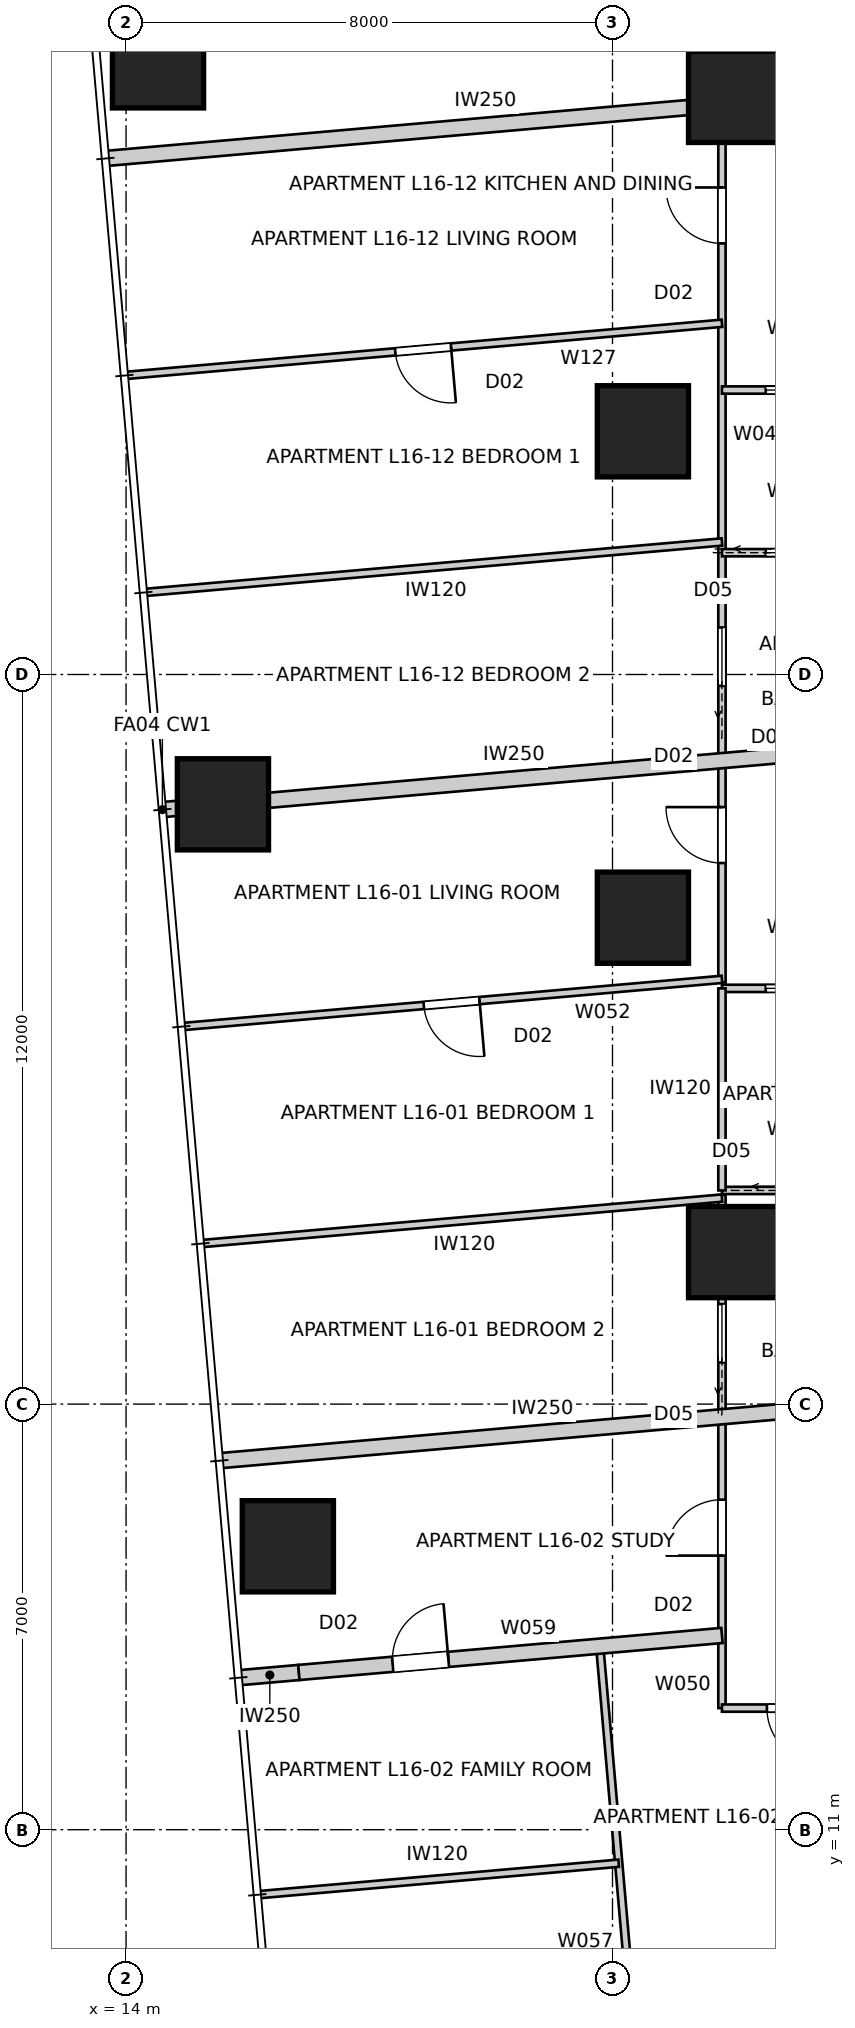
"""IFC4 building model, lengths in metres.
Left out: names, types, materials, properties, quantities, classifications, styles, units other than length and angle.
Written with IfcOpenShell. Run it as: python <this file> out.ifc"""

import sys

from ifc_helpers import new_model, si_unit, direction, frame, frame_2d, origin, origin_2d, place, context, subcontext, project, spatial, rectangle, extrude, element, fill, save


model = new_model("IFC4")
c1 = context("Model", 3, precision=1e-05, world=origin(), true_north=direction((0.0, 1.0)))
c2 = subcontext(c1, "Body", "Model", "MODEL_VIEW")
j1 = project(units=[si_unit("LENGTHUNIT", "METRE"), si_unit("PLANEANGLEUNIT", "RADIAN")], contexts=[c1])
p1 = place(None, origin())
s1 = spatial("IfcSite", under=j1, at=p1, CompositionType="ELEMENT")
p2 = place(p1, origin())
s2 = spatial("IfcBuilding", under=s1, at=p2, CompositionType="ELEMENT")
p3 = place(p2, frame((0.0, 0.0, 60.8)))
s3 = spatial("IfcBuildingStorey", under=s2, at=p3, CompositionType="ELEMENT", Elevation=60.8)
for number, where, z_axis, x_axis in (
    (1, (14.526, 40.068, 0.0), (0.0, 0.0, 1.0), (1.0, 0.0, 0.0)),
    (2, (15.593, 27.865, 0.0), (0.0, 0.0, 1.0), (1.0, 0.0, 0.0)),
    (3, (16.661, 15.661, 0.0), (0.0, 0.0, 1.0), (1.0, 0.0, 0.0)),
    (4, (24.0, 39.5, 0.0), (0.0, 0.0, 1.0), (1.0, 0.0, 0.0)),
    (5, (22.5, 34.0, 0.0), (0.0, 0.0, 1.0), (1.0, 0.0, 0.0)),
    (6, (22.5, 26.0, 0.0), (0.0, 0.0, 1.0), (1.0, 0.0, 0.0)),
    (7, (24.0, 20.5, 0.0), (0.0, 0.0, 1.0), (1.0, 0.0, 0.0)),
):
    element("IfcColumn", number, at=place(p3, frame(where, z_axis=z_axis, x_axis=x_axis)), inside=s3, PredefinedType="COLUMN", context=c2, shape_type="SweptSolid", body=[
        extrude(rectangle(XDim=1.5, YDim=1.5, at=origin_2d()), origin(), (0.0, 0.0, 1.0), 3.4),
    ])
p4 = place(p3, frame((13.66, 38.487, 0.0), z_axis=(0.0, 0.0, 1.0), x_axis=(0.996194851608, 0.087153988028, 0.0)))
e8 = element("IfcWall", 8, at=p4, inside=s3, PredefinedType="PARTITIONING", context=c2, shape_type="SweptSolid", body=[
    extrude(rectangle(XDim=12.617, YDim=0.25, at=frame_2d((6.309, 0.0))), origin(), (0.0, 0.0, 1.0), 3.25),
])
p5 = place(p3, frame((15.534, 17.068, 0.0), z_axis=(0.0, 0.0, 1.0), x_axis=(0.996193939644, 0.08716441141, 0.0)))
e9 = element("IfcWall", 9, at=p5, inside=s3, PredefinedType="PARTITIONING", context=c2, shape_type="SweptSolid", body=[
    extrude(rectangle(XDim=10.736, YDim=0.25, at=frame_2d((5.368, 0.0))), origin(), (0.0, 0.0, 1.0), 3.25),
])
p6 = place(p3, frame((14.597, 27.778, 0.0), z_axis=(0.0, 0.0, 1.0), x_axis=(0.996195419442, 0.087147497287, 0.0)))
e10 = element("IfcWall", 10, at=p6, inside=s3, PredefinedType="PARTITIONING", context=c2, shape_type="SweptSolid", body=[
    extrude(rectangle(XDim=11.677, YDim=0.25, at=frame_2d((5.838, 0.0))), origin(), (0.0, 0.0, 1.0), 3.25),
])
p7 = place(p3, frame((26.2, 24.838, 0.0), z_axis=(0.0, 0.0, 1.0), x_axis=(-1.0, 0.0, 0.0)))
e11 = element("IfcWall", 11, at=p7, inside=s3, PredefinedType="PARTITIONING", context=c2, shape_type="SweptSolid", body=[
    extrude(rectangle(XDim=2.4, YDim=0.12, at=frame_2d((1.2, 0.0))), origin(), (0.0, 0.0, 1.0), 3.25),
])
p8 = place(p7, frame((0.72, 0.0, 0.0)))
e12 = element("IfcOpeningElement", 12, at=p8, cuts=e11, PredefinedType="OPENING", context=c2, shape_type="SweptSolid", body=[
    extrude(rectangle(XDim=0.96, YDim=2.1, at=frame_2d((0.48, 1.05))), frame((0.0, 0.07, 0.0), z_axis=(0.0, -1.0, 0.0), x_axis=(1.0, 0.0, 0.0)), (0.0, 0.0, 1.0), 0.14),
])
p9 = place(p3, frame((23.8, 24.936, 0.0), z_axis=(0.0, 0.0, 1.0), x_axis=(0.0, 1.0, 0.0)))
e13 = element("IfcWall", 13, at=p9, inside=s3, PredefinedType="PARTITIONING", context=c2, shape_type="SweptSolid", body=[
    extrude(rectangle(XDim=22.064, YDim=0.12, at=frame_2d((11.032, 0.0))), origin(), (0.0, 0.0, 1.0), 2.55),
])
p10 = place(p9, frame((12.155, 0.0, 0.0)))
e14 = element("IfcOpeningElement", 14, at=p10, cuts=e13, PredefinedType="OPENING", context=c2, shape_type="SweptSolid", body=[
    extrude(rectangle(XDim=0.92, YDim=2.34, at=frame_2d((0.46, 1.17))), frame((0.0, 0.07, 0.0), z_axis=(0.0, -1.0, 0.0), x_axis=(1.0, 0.0, 0.0)), (0.0, 0.0, 1.0), 0.14),
])
p11 = place(p9, frame((16.136, 0.0, 0.0)))
e15 = element("IfcOpeningElement", 15, at=p11, cuts=e13, PredefinedType="OPENING", context=c2, shape_type="SweptSolid", body=[
    extrude(rectangle(XDim=0.92, YDim=2.34, at=frame_2d((0.46, 1.17))), frame((0.0, 0.07, 0.0), z_axis=(0.0, -1.0, 0.0), x_axis=(1.0, 0.0, 0.0)), (0.0, 0.0, 1.0), 0.14),
])
p12 = place(p9, frame((1.964, 0.0, 0.0)))
e16 = element("IfcOpeningElement", 16, at=p12, cuts=e13, PredefinedType="OPENING", context=c2, shape_type="SweptSolid", body=[
    extrude(rectangle(XDim=0.92, YDim=2.34, at=frame_2d((0.46, 1.17))), frame((0.0, 0.07, 0.0), z_axis=(0.0, -1.0, 0.0), x_axis=(1.0, 0.0, 0.0)), (0.0, 0.0, 1.0), 0.14),
])
p13 = place(p9, frame((4.877, 0.0, 0.0)))
e17 = element("IfcOpeningElement", 17, at=p13, cuts=e13, PredefinedType="OPENING", context=c2, shape_type="SweptSolid", body=[
    extrude(rectangle(XDim=0.96, YDim=2.1, at=frame_2d((0.48, 1.05))), frame((0.0, 0.07, 0.0), z_axis=(0.0, -1.0, 0.0), x_axis=(1.0, 0.0, 0.0)), (0.0, 0.0, 1.0), 0.14),
])
p14 = place(p3, frame((23.8, 21.514, 0.0), z_axis=(0.0, 0.0, 1.0), x_axis=(1.0, 0.0, 0.0)))
e18 = element("IfcWall", 18, at=p14, inside=s3, PredefinedType="PARTITIONING", context=c2, shape_type="SweptSolid", body=[
    extrude(rectangle(XDim=2.4, YDim=0.12, at=frame_2d((1.2, 0.0))), origin(), (0.0, 0.0, 1.0), 3.25),
])
p15 = place(p14, frame((1.02, 0.0, 0.0)))
e19 = element("IfcOpeningElement", 19, at=p15, cuts=e18, PredefinedType="OPENING", context=c2, shape_type="SweptSolid", body=[
    extrude(rectangle(XDim=0.96, YDim=2.1, at=frame_2d((0.48, 1.05))), frame((0.0, 0.07, 0.0), z_axis=(0.0, -1.0, 0.0), x_axis=(1.0, 0.0, 0.0)), (0.0, 0.0, 1.0), 0.14),
])
p16 = place(p3, frame((23.8, 13.0, 0.0), z_axis=(0.0, 0.0, 1.0), x_axis=(0.0, 1.0, 0.0)))
e20 = element("IfcWall", 20, at=p16, inside=s3, PredefinedType="PARTITIONING", context=c2, shape_type="SweptSolid", body=[
    extrude(rectangle(XDim=8.439, YDim=0.12, at=frame_2d((4.219, 0.0))), origin(), (0.0, 0.0, 1.0), 2.55),
])
p17 = place(p16, frame((2.508, 0.0, 0.0)))
e21 = element("IfcOpeningElement", 21, at=p17, cuts=e20, PredefinedType="OPENING", context=c2, shape_type="SweptSolid", body=[
    extrude(rectangle(XDim=0.92, YDim=2.34, at=frame_2d((0.46, 1.17))), frame((0.0, 0.07, 0.0), z_axis=(0.0, -1.0, 0.0), x_axis=(1.0, 0.0, 0.0)), (0.0, 0.0, 1.0), 0.14),
])
p18 = place(p16, frame((5.685, 0.0, 0.0)))
e22 = element("IfcOpeningElement", 22, at=p18, cuts=e20, PredefinedType="OPENING", context=c2, shape_type="SweptSolid", body=[
    extrude(rectangle(XDim=0.96, YDim=2.1, at=frame_2d((0.48, 1.05))), frame((0.0, 0.07, 0.0), z_axis=(0.0, -1.0, 0.0), x_axis=(1.0, 0.0, 0.0)), (0.0, 0.0, 1.0), 0.14),
])
p19 = place(p3, frame((23.8, 21.514, 0.0), z_axis=(0.0, 0.0, 1.0), x_axis=(0.0, 1.0, 0.0)))
e23 = element("IfcWall", 23, at=p19, inside=s3, PredefinedType="PARTITIONING", context=c2, shape_type="SweptSolid", body=[
    extrude(rectangle(XDim=3.324, YDim=0.12, at=frame_2d((1.662, 0.0))), origin(), (0.0, 0.0, 1.0), 3.25),
])
p20 = place(p3, frame((23.8, 24.986, 0.0), z_axis=(0.0, 0.0, 1.0), x_axis=(-0.996194045583, -0.087163200634, 0.0)))
e24 = element("IfcWall", 24, at=p20, inside=s3, PredefinedType="PARTITIONING", context=c2, shape_type="SweptSolid", body=[
    extrude(rectangle(XDim=8.885, YDim=0.12, at=frame_2d((4.442, 0.0))), origin(), (0.0, 0.0, 1.0), 3.25),
])
p21 = place(p20, frame((4.002, 0.0, 0.0)))
e25 = element("IfcOpeningElement", 25, at=p21, cuts=e24, PredefinedType="OPENING", context=c2, shape_type="SweptSolid", body=[
    extrude(rectangle(XDim=0.92, YDim=2.34, at=frame_2d((0.46, 1.17))), frame((0.0, 0.07, 0.0), z_axis=(0.0, -1.0, 0.0), x_axis=(1.0, 0.0, 0.0)), (0.0, 0.0, 1.0), 0.14),
])
p22 = place(p3, frame((23.8, 21.389, 0.0), z_axis=(0.0, 0.0, 1.0), x_axis=(-0.996194273991, -0.087160590107, 0.0)))
e26 = element("IfcWall", 26, at=p22, inside=s3, PredefinedType="PARTITIONING", context=c2, shape_type="SweptSolid", body=[
    extrude(rectangle(XDim=8.571, YDim=0.12, at=frame_2d((4.286, 0.0))), origin(), (0.0, 0.0, 1.0), 3.25),
])
p23 = place(p3, frame((30.333, 13.0, 0.0), z_axis=(0.0, 0.0, 1.0), x_axis=(-1.0, 0.0, 0.0)))
e27 = element("IfcWall", 27, at=p23, inside=s3, PredefinedType="PARTITIONING", context=c2, shape_type="SweptSolid", body=[
    extrude(rectangle(XDim=6.533, YDim=0.12, at=frame_2d((3.267, 0.0))), origin(), (0.0, 0.0, 1.0), 3.25),
])
p24 = place(p23, frame((4.873, 0.0, 0.0)))
e28 = element("IfcOpeningElement", 28, at=p24, cuts=e27, PredefinedType="OPENING", context=c2, shape_type="SweptSolid", body=[
    extrude(rectangle(XDim=0.92, YDim=2.34, at=frame_2d((0.46, 1.17))), frame((0.0, 0.07, 0.0), z_axis=(0.0, -1.0, 0.0), x_axis=(1.0, 0.0, 0.0)), (0.0, 0.0, 1.0), 0.14),
])
p25 = place(p23, frame((1.162, 0.0, 0.0)))
e29 = element("IfcOpeningElement", 29, at=p25, cuts=e27, PredefinedType="OPENING", context=c2, shape_type="SweptSolid", body=[
    extrude(rectangle(XDim=0.96, YDim=2.1, at=frame_2d((0.48, 1.05))), frame((0.0, 0.07, 0.0), z_axis=(0.0, -1.0, 0.0), x_axis=(1.0, 0.0, 0.0)), (0.0, 0.0, 1.0), 0.14),
])
p26 = place(p3, frame((22.759, 2.934, 0.0), z_axis=(0.0, 0.0, 1.0), x_axis=(-0.087130477128, 0.996196908224, 0.0)))
e30 = element("IfcWall", 30, at=p26, inside=s3, PredefinedType="PARTITIONING", context=c2, shape_type="SweptSolid", body=[
    extrude(rectangle(XDim=11.127, YDim=0.12, at=frame_2d((5.563, 0.0))), origin(), (0.0, 0.0, 1.0), 3.25),
])
p27 = place(p26, frame((3.317, 0.0, 0.0)))
e31 = element("IfcOpeningElement", 31, at=p27, cuts=e30, PredefinedType="OPENING", context=c2, shape_type="SweptSolid", body=[
    extrude(rectangle(XDim=0.92, YDim=2.34, at=frame_2d((0.46, 1.17))), frame((0.0, 0.07, 0.0), z_axis=(0.0, -1.0, 0.0), x_axis=(1.0, 0.0, 0.0)), (0.0, 0.0, 1.0), 0.14),
])
p28 = place(p3, frame((15.886, 13.502, 0.0), z_axis=(0.0, 0.0, 1.0), x_axis=(0.996187918168, 0.087233202944, 0.0)))
e32 = element("IfcWall", 32, at=p28, inside=s3, PredefinedType="PARTITIONING", context=c2, shape_type="SweptSolid", body=[
    extrude(rectangle(XDim=0.96, YDim=0.25, at=frame_2d((0.48, 0.0))), origin(), (0.0, 0.0, 1.0), 3.25),
])
p29 = place(p3, frame((16.843, 13.586, 0.0), z_axis=(0.0, 0.0, 1.0), x_axis=(0.996195462691, 0.087147002895, 0.0)))
e33 = element("IfcWall", 33, at=p29, inside=s3, PredefinedType="PARTITIONING", context=c2, shape_type="SweptSolid", body=[
    extrude(rectangle(XDim=6.984, YDim=0.25, at=frame_2d((3.492, 0.0))), origin(), (0.0, 0.0, 1.0), 2.638),
])
p30 = place(p29, frame((1.548, 0.0, 0.0)))
e34 = element("IfcOpeningElement", 34, at=p30, cuts=e33, PredefinedType="OPENING", context=c2, shape_type="SweptSolid", body=[
    extrude(rectangle(XDim=0.92, YDim=2.34, at=frame_2d((0.46, 1.17))), frame((0.0, 0.135, 0.0), z_axis=(0.0, -1.0, 0.0), x_axis=(1.0, 0.0, 0.0)), (0.0, 0.0, 1.0), 0.27),
])
p31 = place(p3, frame((16.198, 9.933, 0.0), z_axis=(0.0, 0.0, 1.0), x_axis=(0.996196712973, 0.08713270948, 0.0)))
e35 = element("IfcWall", 35, at=p31, inside=s3, PredefinedType="PARTITIONING", context=c2, shape_type="SweptSolid", body=[
    extrude(rectangle(XDim=5.926, YDim=0.12, at=frame_2d((2.963, 0.0))), origin(), (0.0, 0.0, 1.0), 3.25),
])
p32 = place(p3, frame((26.2, 34.678, 0.0), z_axis=(0.0, 0.0, 1.0), x_axis=(-1.0, 0.0, 0.0)))
e36 = element("IfcWall", 36, at=p32, inside=s3, PredefinedType="PARTITIONING", context=c2, shape_type="SweptSolid", body=[
    extrude(rectangle(XDim=2.4, YDim=0.12, at=frame_2d((1.2, 0.0))), origin(), (0.0, 0.0, 1.0), 3.25),
])
p33 = place(p32, frame((0.72, 0.0, 0.0)))
e37 = element("IfcOpeningElement", 37, at=p33, cuts=e36, PredefinedType="OPENING", context=c2, shape_type="SweptSolid", body=[
    extrude(rectangle(XDim=0.96, YDim=2.1, at=frame_2d((0.48, 1.05))), frame((0.0, 0.07, 0.0), z_axis=(0.0, -1.0, 0.0), x_axis=(1.0, 0.0, 0.0)), (0.0, 0.0, 1.0), 0.14),
])
p34 = place(p3, frame((23.8, 32.003, 0.0), z_axis=(0.0, 0.0, 1.0), x_axis=(1.0, 0.0, 0.0)))
e38 = element("IfcWall", 38, at=p34, inside=s3, PredefinedType="PARTITIONING", context=c2, shape_type="SweptSolid", body=[
    extrude(rectangle(XDim=2.4, YDim=0.12, at=frame_2d((1.2, 0.0))), origin(), (0.0, 0.0, 1.0), 3.25),
])
p35 = place(p34, frame((0.72, 0.0, 0.0)))
e39 = element("IfcOpeningElement", 39, at=p35, cuts=e38, PredefinedType="OPENING", context=c2, shape_type="SweptSolid", body=[
    extrude(rectangle(XDim=0.96, YDim=2.1, at=frame_2d((0.48, 1.05))), frame((0.0, 0.07, 0.0), z_axis=(0.0, -1.0, 0.0), x_axis=(1.0, 0.0, 0.0)), (0.0, 0.0, 1.0), 0.14),
])
p36 = place(p3, frame((23.8, 35.777, 0.0), z_axis=(0.0, 0.0, 1.0), x_axis=(-0.996195794011, -0.087143215425, 0.0)))
e40 = element("IfcWall", 40, at=p36, inside=s3, PredefinedType="PARTITIONING", context=c2, shape_type="SweptSolid", body=[
    extrude(rectangle(XDim=9.825, YDim=0.12, at=frame_2d((4.913, 0.0))), origin(), (0.0, 0.0, 1.0), 2.796),
])
p37 = place(p36, frame((4.473, 0.0, 0.0)))
e41 = element("IfcOpeningElement", 41, at=p37, cuts=e40, PredefinedType="OPENING", context=c2, shape_type="SweptSolid", body=[
    extrude(rectangle(XDim=0.92, YDim=2.34, at=frame_2d((0.46, 1.17))), frame((0.0, 0.07, 0.0), z_axis=(0.0, -1.0, 0.0), x_axis=(1.0, 0.0, 0.0)), (0.0, 0.0, 1.0), 0.14),
])
p38 = place(p3, frame((23.8, 32.18, 0.0), z_axis=(0.0, 0.0, 1.0), x_axis=(-0.996193828936, -0.087165676674, 0.0)))
e42 = element("IfcWall", 42, at=p38, inside=s3, PredefinedType="PARTITIONING", context=c2, shape_type="SweptSolid", body=[
    extrude(rectangle(XDim=9.512, YDim=0.12, at=frame_2d((4.756, 0.0))), origin(), (0.0, 0.0, 1.0), 3.25),
])
p39 = place(p10, origin())
e43 = element("IfcDoor", 43, at=p39, inside=s3, OperationType="SINGLE_SWING_RIGHT", PredefinedType="DOOR", context=c2, shape_type="SweptSolid", body=[
    extrude(rectangle(XDim=0.92, YDim=2.34, at=frame_2d((0.46, 1.17))), frame((0.0, 0.025, 0.0), z_axis=(0.0, -1.0, 0.0), x_axis=(1.0, 0.0, 0.0)), (0.0, 0.0, 1.0), 0.05),
])
fill(e14, e43)
p40 = place(p33, origin())
e44 = element("IfcDoor", 44, at=p40, inside=s3, OperationType="SLIDING_TO_LEFT", PredefinedType="DOOR", context=c2, shape_type="SweptSolid", body=[
    extrude(rectangle(XDim=0.96, YDim=2.1, at=frame_2d((0.48, 1.05))), frame((0.0, 0.025, 0.0), z_axis=(0.0, -1.0, 0.0), x_axis=(1.0, 0.0, 0.0)), (0.0, 0.0, 1.0), 0.05),
])
fill(e37, e44)
p41 = place(p12, origin())
e45 = element("IfcDoor", 45, at=p41, inside=s3, OperationType="SINGLE_SWING_RIGHT", PredefinedType="DOOR", context=c2, shape_type="SweptSolid", body=[
    extrude(rectangle(XDim=0.92, YDim=2.34, at=frame_2d((0.46, 1.17))), frame((0.0, 0.025, 0.0), z_axis=(0.0, -1.0, 0.0), x_axis=(1.0, 0.0, 0.0)), (0.0, 0.0, 1.0), 0.05),
])
fill(e16, e45)
p42 = place(p8, origin())
e46 = element("IfcDoor", 46, at=p42, inside=s3, OperationType="SLIDING_TO_LEFT", PredefinedType="DOOR", context=c2, shape_type="SweptSolid", body=[
    extrude(rectangle(XDim=0.96, YDim=2.1, at=frame_2d((0.48, 1.05))), frame((0.0, 0.025, 0.0), z_axis=(0.0, -1.0, 0.0), x_axis=(1.0, 0.0, 0.0)), (0.0, 0.0, 1.0), 0.05),
])
fill(e12, e46)
p43 = place(p17, origin())
e47 = element("IfcDoor", 47, at=p43, inside=s3, OperationType="SINGLE_SWING_LEFT", PredefinedType="DOOR", context=c2, shape_type="SweptSolid", body=[
    extrude(rectangle(XDim=0.92, YDim=2.34, at=frame_2d((0.46, 1.17))), frame((0.0, 0.025, 0.0), z_axis=(0.0, -1.0, 0.0), x_axis=(1.0, 0.0, 0.0)), (0.0, 0.0, 1.0), 0.05),
])
fill(e21, e47)
p44 = place(p24, origin())
e48 = element("IfcDoor", 48, at=p44, inside=s3, OperationType="SINGLE_SWING_LEFT", PredefinedType="DOOR", context=c2, shape_type="SweptSolid", body=[
    extrude(rectangle(XDim=0.92, YDim=2.34, at=frame_2d((0.46, 1.17))), frame((0.0, 0.025, 0.0), z_axis=(0.0, -1.0, 0.0), x_axis=(1.0, 0.0, 0.0)), (0.0, 0.0, 1.0), 0.05),
])
fill(e28, e48)
p45 = place(p37, origin())
e49 = element("IfcDoor", 49, at=p45, inside=s3, OperationType="SINGLE_SWING_LEFT", PredefinedType="DOOR", context=c2, shape_type="SweptSolid", body=[
    extrude(rectangle(XDim=0.92, YDim=2.34, at=frame_2d((0.46, 1.17))), frame((0.0, 0.025, 0.0), z_axis=(0.0, -1.0, 0.0), x_axis=(1.0, 0.0, 0.0)), (0.0, 0.0, 1.0), 0.05),
])
fill(e41, e49)
p46 = place(p35, origin())
e50 = element("IfcDoor", 50, at=p46, inside=s3, OperationType="SLIDING_TO_LEFT", PredefinedType="DOOR", context=c2, shape_type="SweptSolid", body=[
    extrude(rectangle(XDim=0.96, YDim=2.1, at=frame_2d((0.48, 1.05))), frame((0.0, 0.025, 0.0), z_axis=(0.0, -1.0, 0.0), x_axis=(1.0, 0.0, 0.0)), (0.0, 0.0, 1.0), 0.05),
])
fill(e39, e50)
p47 = place(p21, origin())
e51 = element("IfcDoor", 51, at=p47, inside=s3, OperationType="SINGLE_SWING_LEFT", PredefinedType="DOOR", context=c2, shape_type="SweptSolid", body=[
    extrude(rectangle(XDim=0.92, YDim=2.34, at=frame_2d((0.46, 1.17))), frame((0.0, 0.025, 0.0), z_axis=(0.0, -1.0, 0.0), x_axis=(1.0, 0.0, 0.0)), (0.0, 0.0, 1.0), 0.05),
])
fill(e25, e51)
p48 = place(p30, origin())
e52 = element("IfcDoor", 52, at=p48, inside=s3, OperationType="SINGLE_SWING_RIGHT", PredefinedType="DOOR", context=c2, shape_type="SweptSolid", body=[
    extrude(rectangle(XDim=0.92, YDim=2.34, at=frame_2d((0.46, 1.17))), frame((0.0, 0.025, 0.0), z_axis=(0.0, -1.0, 0.0), x_axis=(1.0, 0.0, 0.0)), (0.0, 0.0, 1.0), 0.05),
])
fill(e34, e52)
p49 = place(p13, origin())
e53 = element("IfcDoor", 53, at=p49, inside=s3, OperationType="SLIDING_TO_LEFT", PredefinedType="DOOR", context=c2, shape_type="SweptSolid", body=[
    extrude(rectangle(XDim=0.96, YDim=2.1, at=frame_2d((0.48, 1.05))), frame((0.0, 0.025, 0.0), z_axis=(0.0, -1.0, 0.0), x_axis=(1.0, 0.0, 0.0)), (0.0, 0.0, 1.0), 0.05),
])
fill(e17, e53)
p50 = place(p18, origin())
e54 = element("IfcDoor", 54, at=p50, inside=s3, OperationType="SLIDING_TO_LEFT", PredefinedType="DOOR", context=c2, shape_type="SweptSolid", body=[
    extrude(rectangle(XDim=0.96, YDim=2.1, at=frame_2d((0.48, 1.05))), frame((0.0, 0.025, 0.0), z_axis=(0.0, -1.0, 0.0), x_axis=(1.0, 0.0, 0.0)), (0.0, 0.0, 1.0), 0.05),
])
fill(e22, e54)
save(model, sys.argv[1])
